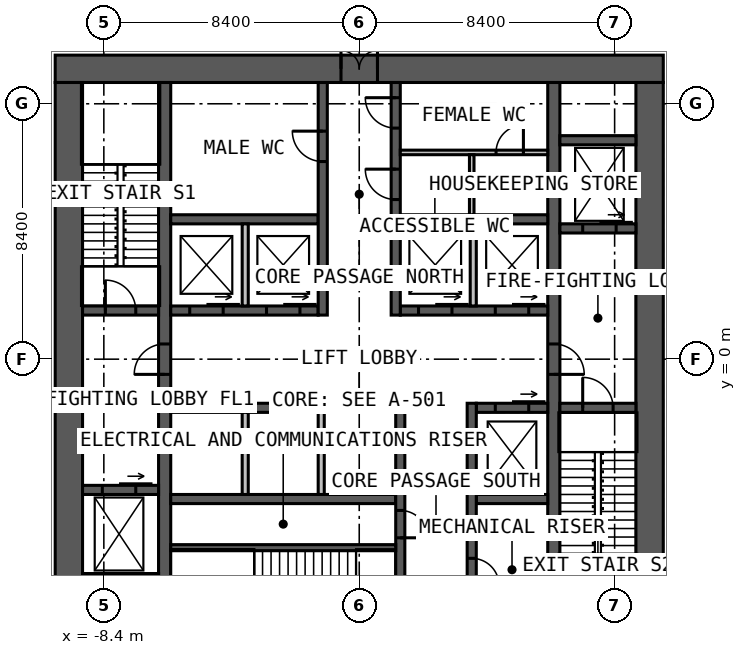
"""IFC4 building model, lengths in metres.
Left out: names, types, materials, properties, quantities, classifications, styles, units other than length and angle.
Written with IfcOpenShell. Run it as: python <this file> out.ifc"""

import sys

from ifc_helpers import new_model, si_unit, direction, frame, frame_2d, origin, place, context, subcontext, project, spatial, rectangle, extrude, element, fill, save


model = new_model("IFC4")
c1 = context("Model", 3, precision=1e-05, world=origin(), true_north=direction((0.0, 1.0)))
c2 = subcontext(c1, "Body", "Model", "MODEL_VIEW")
j1 = project(units=[si_unit("LENGTHUNIT", "METRE"), si_unit("PLANEANGLEUNIT", "RADIAN")], contexts=[c1])
p1 = place(None, origin())
s1 = spatial("IfcSite", under=j1, at=p1, CompositionType="ELEMENT")
p2 = place(p1, origin())
s2 = spatial("IfcBuilding", under=s1, at=p2, CompositionType="ELEMENT")
p3 = place(p2, frame((0.0, 0.0, -9.0)))
s3 = spatial("IfcBuildingStorey", under=s2, at=p3, CompositionType="ELEMENT", Elevation=-9.0)
p4 = place(p3, frame((-10.0, 9.55, 0.0), z_axis=(0.0, 0.0, 1.0), x_axis=(1.0, 0.0, 0.0)))
e1 = element("IfcWall", 1, at=p4, inside=s3, PredefinedType="SOLIDWALL", context=c2, shape_type="SweptSolid", body=[
    extrude(rectangle(XDim=20.0, YDim=0.9, at=frame_2d((10.0, 0.0))), origin(), (0.0, 0.0, 1.0), 4.5),
])
p5 = place(p4, frame((9.4, 0.0, 0.0)))
e2 = element("IfcOpeningElement", 2, at=p5, cuts=e1, PredefinedType="OPENING", context=c2, shape_type="SweptSolid", body=[
    extrude(rectangle(XDim=1.2, YDim=2.2, at=frame_2d((0.6, 1.1))), frame((0.0, 0.46, 0.0), z_axis=(0.0, -1.0, 0.0), x_axis=(1.0, 0.0, 0.0)), (0.0, 0.0, 1.0), 0.92),
])
for number, where, z_axis, x_axis in (
    (3, (9.55, -9.1, 0.0), (0.0, 0.0, 1.0), (0.0, 1.0, 0.0)),
    (4, (-9.55, 9.1, 0.0), (0.0, 0.0, 1.0), (0.0, -1.0, 0.0)),
):
    element("IfcWall", number, at=place(p3, frame(where, z_axis=z_axis, x_axis=x_axis)), inside=s3, PredefinedType="SOLIDWALL", context=c2, shape_type="SweptSolid", body=[
        extrude(rectangle(XDim=18.2, YDim=0.9, at=frame_2d((9.1, 0.0))), origin(), (0.0, 0.0, 1.0), 4.5),
    ])
p6 = place(p3, frame((-6.4, -9.1, 0.0), z_axis=(0.0, 0.0, 1.0), x_axis=(0.0, 1.0, 0.0)))
e5 = element("IfcWall", 5, at=p6, inside=s3, PredefinedType="SOLIDWALL", context=c2, shape_type="SweptSolid", body=[
    extrude(rectangle(XDim=18.2, YDim=0.4, at=frame_2d((9.1, 0.0))), origin(), (0.0, 0.0, 1.0), 4.5),
])
p7 = place(p6, frame((8.6, 0.0, 0.0)))
e6 = element("IfcOpeningElement", 6, at=p7, cuts=e5, PredefinedType="OPENING", context=c2, shape_type="SweptSolid", body=[
    extrude(rectangle(XDim=1.0, YDim=2.2, at=frame_2d((0.5, 1.1))), frame((0.0, 0.21, 0.0), z_axis=(0.0, -1.0, 0.0), x_axis=(1.0, 0.0, 0.0)), (0.0, 0.0, 1.0), 0.42),
])
p8 = place(p3, frame((6.4, 9.1, 0.0), z_axis=(0.0, 0.0, 1.0), x_axis=(0.0, -1.0, 0.0)))
e7 = element("IfcWall", 7, at=p8, inside=s3, PredefinedType="SOLIDWALL", context=c2, shape_type="SweptSolid", body=[
    extrude(rectangle(XDim=18.2, YDim=0.4, at=frame_2d((9.1, 0.0))), origin(), (0.0, 0.0, 1.0), 4.5),
])
p9 = place(p8, frame((8.6, 0.0, 0.0)))
e8 = element("IfcOpeningElement", 8, at=p9, cuts=e7, PredefinedType="OPENING", context=c2, shape_type="SweptSolid", body=[
    extrude(rectangle(XDim=1.0, YDim=2.2, at=frame_2d((0.5, 1.1))), frame((0.0, 0.21, 0.0), z_axis=(0.0, -1.0, 0.0), x_axis=(1.0, 0.0, 0.0)), (0.0, 0.0, 1.0), 0.42),
])
p10 = place(p3, frame((-6.2, 1.6, 0.0), z_axis=(0.0, 0.0, 1.0), x_axis=(1.0, 0.0, 0.0)))
e9 = element("IfcWall", 9, at=p10, inside=s3, PredefinedType="SOLIDWALL", context=c2, shape_type="SweptSolid", body=[
    extrude(rectangle(XDim=4.85, YDim=0.3, at=frame_2d((2.425, 0.0))), origin(), (0.0, 0.0, 1.0), 4.5),
])
p11 = place(p10, frame((0.625, 0.0, 0.0)))
e10 = element("IfcOpeningElement", 10, at=p11, cuts=e9, PredefinedType="OPENING", context=c2, shape_type="SweptSolid", body=[
    extrude(rectangle(XDim=1.1, YDim=2.2, at=frame_2d((0.55, 1.1))), frame((0.0, 0.16, 0.0), z_axis=(0.0, -1.0, 0.0), x_axis=(1.0, 0.0, 0.0)), (0.0, 0.0, 1.0), 0.32),
])
p12 = place(p10, frame((3.15, 0.0, 0.0)))
e11 = element("IfcOpeningElement", 11, at=p12, cuts=e9, PredefinedType="OPENING", context=c2, shape_type="SweptSolid", body=[
    extrude(rectangle(XDim=1.1, YDim=2.2, at=frame_2d((0.55, 1.1))), frame((0.0, 0.16, 0.0), z_axis=(0.0, -1.0, 0.0), x_axis=(1.0, 0.0, 0.0)), (0.0, 0.0, 1.0), 0.32),
])
p13 = place(p3, frame((1.35, 1.6, 0.0), z_axis=(0.0, 0.0, 1.0), x_axis=(1.0, 0.0, 0.0)))
e12 = element("IfcWall", 12, at=p13, inside=s3, PredefinedType="SOLIDWALL", context=c2, shape_type="SweptSolid", body=[
    extrude(rectangle(XDim=4.85, YDim=0.3, at=frame_2d((2.425, 0.0))), origin(), (0.0, 0.0, 1.0), 4.5),
])
p14 = place(p13, frame((0.6, 0.0, 0.0)))
e13 = element("IfcOpeningElement", 13, at=p14, cuts=e12, PredefinedType="OPENING", context=c2, shape_type="SweptSolid", body=[
    extrude(rectangle(XDim=1.1, YDim=2.2, at=frame_2d((0.55, 1.1))), frame((0.0, 0.16, 0.0), z_axis=(0.0, -1.0, 0.0), x_axis=(1.0, 0.0, 0.0)), (0.0, 0.0, 1.0), 0.32),
])
p15 = place(p13, frame((3.125, 0.0, 0.0)))
e14 = element("IfcOpeningElement", 14, at=p15, cuts=e12, PredefinedType="OPENING", context=c2, shape_type="SweptSolid", body=[
    extrude(rectangle(XDim=1.1, YDim=2.2, at=frame_2d((0.55, 1.1))), frame((0.0, 0.16, 0.0), z_axis=(0.0, -1.0, 0.0), x_axis=(1.0, 0.0, 0.0)), (0.0, 0.0, 1.0), 0.32),
])
for number, where, z_axis, x_axis in (
    (15, (-6.2, 4.6, 0.0), (0.0, 0.0, 1.0), (1.0, 0.0, 0.0)),
    (16, (1.35, 4.6, 0.0), (0.0, 0.0, 1.0), (1.0, 0.0, 0.0)),
):
    element("IfcWall", number, at=place(p3, frame(where, z_axis=z_axis, x_axis=x_axis)), inside=s3, PredefinedType="SOLIDWALL", context=c2, shape_type="SweptSolid", body=[
        extrude(rectangle(XDim=4.85, YDim=0.3, at=frame_2d((2.425, 0.0))), origin(), (0.0, 0.0, 1.0), 4.5),
    ])
p16 = place(p3, frame((-1.2, 1.45, 0.0), z_axis=(0.0, 0.0, 1.0), x_axis=(0.0, 1.0, 0.0)))
e17 = element("IfcWall", 17, at=p16, inside=s3, PredefinedType="SOLIDWALL", context=c2, shape_type="SweptSolid", body=[
    extrude(rectangle(XDim=7.65, YDim=0.3, at=frame_2d((3.825, 0.0))), origin(), (0.0, 0.0, 1.0), 4.5),
])
p17 = place(p16, frame((5.05, 0.0, 0.0)))
e18 = element("IfcOpeningElement", 18, at=p17, cuts=e17, PredefinedType="OPENING", context=c2, shape_type="SweptSolid", body=[
    extrude(rectangle(XDim=1.0, YDim=2.2, at=frame_2d((0.5, 1.1))), frame((0.0, 0.16, 0.0), z_axis=(0.0, -1.0, 0.0), x_axis=(1.0, 0.0, 0.0)), (0.0, 0.0, 1.0), 0.32),
])
p18 = place(p3, frame((1.2, 1.45, 0.0), z_axis=(0.0, 0.0, 1.0), x_axis=(0.0, 1.0, 0.0)))
e19 = element("IfcWall", 19, at=p18, inside=s3, PredefinedType="SOLIDWALL", context=c2, shape_type="SweptSolid", body=[
    extrude(rectangle(XDim=7.65, YDim=0.3, at=frame_2d((3.825, 0.0))), origin(), (0.0, 0.0, 1.0), 4.5),
])
p19 = place(p18, frame((3.8, 0.0, 0.0)))
e20 = element("IfcOpeningElement", 20, at=p19, cuts=e19, PredefinedType="OPENING", context=c2, shape_type="SweptSolid", body=[
    extrude(rectangle(XDim=1.0, YDim=2.2, at=frame_2d((0.5, 1.1))), frame((0.0, 0.16, 0.0), z_axis=(0.0, -1.0, 0.0), x_axis=(1.0, 0.0, 0.0)), (0.0, 0.0, 1.0), 0.32),
])
p20 = place(p18, frame((6.15, 0.0, 0.0)))
e21 = element("IfcOpeningElement", 21, at=p20, cuts=e19, PredefinedType="OPENING", context=c2, shape_type="SweptSolid", body=[
    extrude(rectangle(XDim=1.0, YDim=2.2, at=frame_2d((0.5, 1.1))), frame((0.0, 0.16, 0.0), z_axis=(0.0, -1.0, 0.0), x_axis=(1.0, 0.0, 0.0)), (0.0, 0.0, 1.0), 0.32),
])
p21 = place(p3, frame((-6.2, -1.6, 0.0), z_axis=(0.0, 0.0, 1.0), x_axis=(1.0, 0.0, 0.0)))
e22 = element("IfcWall", 22, at=p21, inside=s3, PredefinedType="SOLIDWALL", context=c2, shape_type="SweptSolid", body=[
    extrude(rectangle(XDim=7.4, YDim=0.3, at=frame_2d((3.7, 0.0))), origin(), (0.0, 0.0, 1.0), 4.5),
])
p22 = place(p3, frame((3.85, -1.6, 0.0), z_axis=(0.0, 0.0, 1.0), x_axis=(1.0, 0.0, 0.0)))
e23 = element("IfcWall", 23, at=p22, inside=s3, PredefinedType="SOLIDWALL", context=c2, shape_type="SweptSolid", body=[
    extrude(rectangle(XDim=2.35, YDim=0.3, at=frame_2d((1.175, 0.0))), origin(), (0.0, 0.0, 1.0), 4.5),
])
p23 = place(p22, frame((0.625, 0.0, 0.0)))
e24 = element("IfcOpeningElement", 24, at=p23, cuts=e23, PredefinedType="OPENING", context=c2, shape_type="SweptSolid", body=[
    extrude(rectangle(XDim=1.1, YDim=2.2, at=frame_2d((0.55, 1.1))), frame((0.0, 0.16, 0.0), z_axis=(0.0, -1.0, 0.0), x_axis=(1.0, 0.0, 0.0)), (0.0, 0.0, 1.0), 0.32),
])
p24 = place(p3, frame((-6.2, -4.6, 0.0), z_axis=(0.0, 0.0, 1.0), x_axis=(1.0, 0.0, 0.0)))
e25 = element("IfcWall", 25, at=p24, inside=s3, PredefinedType="SOLIDWALL", context=c2, shape_type="SweptSolid", body=[
    extrude(rectangle(XDim=7.4, YDim=0.3, at=frame_2d((3.7, 0.0))), origin(), (0.0, 0.0, 1.0), 4.5),
])
p25 = place(p3, frame((3.85, -4.6, 0.0), z_axis=(0.0, 0.0, 1.0), x_axis=(1.0, 0.0, 0.0)))
e26 = element("IfcWall", 26, at=p25, inside=s3, PredefinedType="SOLIDWALL", context=c2, shape_type="SweptSolid", body=[
    extrude(rectangle(XDim=2.35, YDim=0.3, at=frame_2d((1.175, 0.0))), origin(), (0.0, 0.0, 1.0), 4.5),
])
p26 = place(p3, frame((1.35, -1.45, 0.0), z_axis=(0.0, 0.0, 1.0), x_axis=(0.0, -1.0, 0.0)))
e27 = element("IfcWall", 27, at=p26, inside=s3, PredefinedType="SOLIDWALL", context=c2, shape_type="SweptSolid", body=[
    extrude(rectangle(XDim=7.65, YDim=0.3, at=frame_2d((3.825, 0.0))), origin(), (0.0, 0.0, 1.0), 4.5),
])
p27 = place(p26, frame((5.75, 0.0, 0.0)))
e28 = element("IfcOpeningElement", 28, at=p27, cuts=e27, PredefinedType="OPENING", context=c2, shape_type="SweptSolid", body=[
    extrude(rectangle(XDim=1.0, YDim=2.2, at=frame_2d((0.5, 1.1))), frame((0.0, 0.16, 0.0), z_axis=(0.0, -1.0, 0.0), x_axis=(1.0, 0.0, 0.0)), (0.0, 0.0, 1.0), 0.32),
])
p28 = place(p26, frame((3.525, 0.0, 0.0)))
e29 = element("IfcOpeningElement", 29, at=p28, cuts=e27, PredefinedType="OPENING", context=c2, shape_type="SweptSolid", body=[
    extrude(rectangle(XDim=0.9, YDim=2.2, at=frame_2d((0.45, 1.1))), frame((0.0, 0.16, 0.0), z_axis=(0.0, -1.0, 0.0), x_axis=(1.0, 0.0, 0.0)), (0.0, 0.0, 1.0), 0.32),
])
p29 = place(p3, frame((3.7, -1.45, 0.0), z_axis=(0.0, 0.0, 1.0), x_axis=(0.0, -1.0, 0.0)))
e30 = element("IfcWall", 30, at=p29, inside=s3, PredefinedType="SOLIDWALL", context=c2, shape_type="SweptSolid", body=[
    extrude(rectangle(XDim=7.65, YDim=0.3, at=frame_2d((3.825, 0.0))), origin(), (0.0, 0.0, 1.0), 4.5),
])
p30 = place(p29, frame((5.1, 0.0, 0.0)))
e31 = element("IfcOpeningElement", 31, at=p30, cuts=e30, PredefinedType="OPENING", context=c2, shape_type="SweptSolid", body=[
    extrude(rectangle(XDim=0.9, YDim=2.2, at=frame_2d((0.45, 1.1))), frame((0.0, 0.16, 0.0), z_axis=(0.0, -1.0, 0.0), x_axis=(1.0, 0.0, 0.0)), (0.0, 0.0, 1.0), 0.32),
])
p31 = place(p3, frame((-6.2, -6.2, 0.0), z_axis=(0.0, 0.0, 1.0), x_axis=(1.0, 0.0, 0.0)))
e32 = element("IfcWall", 32, at=p31, inside=s3, PredefinedType="SOLIDWALL", context=c2, shape_type="SweptSolid", body=[
    extrude(rectangle(XDim=7.4, YDim=0.2, at=frame_2d((3.7, 0.0))), origin(), (0.0, 0.0, 1.0), 4.5),
])
p32 = place(p3, frame((-9.1, 1.6, 0.0), z_axis=(0.0, 0.0, 1.0), x_axis=(1.0, 0.0, 0.0)))
e33 = element("IfcWall", 33, at=p32, inside=s3, PredefinedType="SOLIDWALL", context=c2, shape_type="SweptSolid", body=[
    extrude(rectangle(XDim=2.5, YDim=0.3, at=frame_2d((1.25, 0.0))), origin(), (0.0, 0.0, 1.0), 4.5),
])
p33 = place(p32, frame((0.75, 0.0, 0.0)))
e34 = element("IfcOpeningElement", 34, at=p33, cuts=e33, PredefinedType="OPENING", context=c2, shape_type="SweptSolid", body=[
    extrude(rectangle(XDim=1.0, YDim=2.2, at=frame_2d((0.5, 1.1))), frame((0.0, 0.16, 0.0), z_axis=(0.0, -1.0, 0.0), x_axis=(1.0, 0.0, 0.0)), (0.0, 0.0, 1.0), 0.32),
])
p34 = place(p3, frame((6.6, -1.6, 0.0), z_axis=(0.0, 0.0, 1.0), x_axis=(1.0, 0.0, 0.0)))
e35 = element("IfcWall", 35, at=p34, inside=s3, PredefinedType="SOLIDWALL", context=c2, shape_type="SweptSolid", body=[
    extrude(rectangle(XDim=2.5, YDim=0.3, at=frame_2d((1.25, 0.0))), origin(), (0.0, 0.0, 1.0), 4.5),
])
p35 = place(p34, frame((0.75, 0.0, 0.0)))
e36 = element("IfcOpeningElement", 36, at=p35, cuts=e35, PredefinedType="OPENING", context=c2, shape_type="SweptSolid", body=[
    extrude(rectangle(XDim=1.0, YDim=2.2, at=frame_2d((0.5, 1.1))), frame((0.0, 0.16, 0.0), z_axis=(0.0, -1.0, 0.0), x_axis=(1.0, 0.0, 0.0)), (0.0, 0.0, 1.0), 0.32),
])
p36 = place(p3, frame((-9.1, -4.3, 0.0), z_axis=(0.0, 0.0, 1.0), x_axis=(1.0, 0.0, 0.0)))
e37 = element("IfcWall", 37, at=p36, inside=s3, PredefinedType="SOLIDWALL", context=c2, shape_type="SweptSolid", body=[
    extrude(rectangle(XDim=2.5, YDim=0.3, at=frame_2d((1.25, 0.0))), origin(), (0.0, 0.0, 1.0), 4.5),
])
p37 = place(p36, frame((0.65, 0.0, 0.0)))
e38 = element("IfcOpeningElement", 38, at=p37, cuts=e37, PredefinedType="OPENING", context=c2, shape_type="SweptSolid", body=[
    extrude(rectangle(XDim=1.1, YDim=2.2, at=frame_2d((0.55, 1.1))), frame((0.0, 0.16, 0.0), z_axis=(0.0, -1.0, 0.0), x_axis=(1.0, 0.0, 0.0)), (0.0, 0.0, 1.0), 0.32),
])
p38 = place(p3, frame((6.6, 4.3, 0.0), z_axis=(0.0, 0.0, 1.0), x_axis=(1.0, 0.0, 0.0)))
e39 = element("IfcWall", 39, at=p38, inside=s3, PredefinedType="SOLIDWALL", context=c2, shape_type="SweptSolid", body=[
    extrude(rectangle(XDim=2.5, YDim=0.3, at=frame_2d((1.25, 0.0))), origin(), (0.0, 0.0, 1.0), 4.5),
])
p39 = place(p38, frame((0.75, 0.0, 0.0)))
e40 = element("IfcOpeningElement", 40, at=p39, cuts=e39, PredefinedType="OPENING", context=c2, shape_type="SweptSolid", body=[
    extrude(rectangle(XDim=1.1, YDim=2.2, at=frame_2d((0.55, 1.1))), frame((0.0, 0.16, 0.0), z_axis=(0.0, -1.0, 0.0), x_axis=(1.0, 0.0, 0.0)), (0.0, 0.0, 1.0), 0.32),
])
for number, where, z_axis, x_axis in (
    (41, (-9.1, -7.2, 0.0), (0.0, 0.0, 1.0), (1.0, 0.0, 0.0)),
    (42, (6.6, 7.2, 0.0), (0.0, 0.0, 1.0), (1.0, 0.0, 0.0)),
):
    element("IfcWall", number, at=place(p3, frame(where, z_axis=z_axis, x_axis=x_axis)), inside=s3, PredefinedType="SOLIDWALL", context=c2, shape_type="SweptSolid", body=[
        extrude(rectangle(XDim=2.5, YDim=0.3, at=frame_2d((1.25, 0.0))), origin(), (0.0, 0.0, 1.0), 4.5),
    ])
for number, where, z_axis, x_axis in (
    (43, (-3.75, 1.75, 0.0), (0.0, 0.0, 1.0), (0.0, 1.0, 0.0)),
    (44, (3.75, 1.75, 0.0), (0.0, 0.0, 1.0), (0.0, 1.0, 0.0)),
    (45, (-3.75, -1.75, 0.0), (0.0, 0.0, 1.0), (0.0, -1.0, 0.0)),
    (46, (-1.25, -1.75, 0.0), (0.0, 0.0, 1.0), (0.0, -1.0, 0.0)),
):
    element("IfcWall", number, at=place(p3, frame(where, z_axis=z_axis, x_axis=x_axis)), inside=s3, PredefinedType="SOLIDWALL", context=c2, shape_type="SweptSolid", body=[
        extrude(rectangle(XDim=2.7, YDim=0.2, at=frame_2d((1.35, 0.0))), origin(), (0.0, 0.0, 1.0), 4.25),
    ])
p40 = place(p3, frame((1.35, 6.8, 0.0), z_axis=(0.0, 0.0, 1.0), x_axis=(1.0, 0.0, 0.0)))
e47 = element("IfcWall", 47, at=p40, inside=s3, PredefinedType="PARTITIONING", context=c2, shape_type="SweptSolid", body=[
    extrude(rectangle(XDim=4.85, YDim=0.15, at=frame_2d((2.425, 0.0))), origin(), (0.0, 0.0, 1.0), 4.25),
])
p41 = place(p40, frame((3.15, 0.0, 0.0)))
e48 = element("IfcOpeningElement", 48, at=p41, cuts=e47, PredefinedType="OPENING", context=c2, shape_type="SweptSolid", body=[
    extrude(rectangle(XDim=0.9, YDim=2.2, at=frame_2d((0.45, 1.1))), frame((0.0, 0.085, 0.0), z_axis=(0.0, -1.0, 0.0), x_axis=(1.0, 0.0, 0.0)), (0.0, 0.0, 1.0), 0.17),
])
p42 = place(p3, frame((3.7, 4.75, 0.0), z_axis=(0.0, 0.0, 1.0), x_axis=(0.0, 1.0, 0.0)))
e49 = element("IfcWall", 49, at=p42, inside=s3, PredefinedType="PARTITIONING", context=c2, shape_type="SweptSolid", body=[
    extrude(rectangle(XDim=1.975, YDim=0.15, at=frame_2d((0.988, 0.0))), origin(), (0.0, 0.0, 1.0), 4.25),
])
p43 = place(p5, origin())
e50 = element("IfcDoor", 50, at=p43, inside=s3, OperationType="DOUBLE_DOOR_SINGLE_SWING", PredefinedType="DOOR", context=c2, shape_type="SweptSolid", body=[
    extrude(rectangle(XDim=1.2, YDim=2.2, at=frame_2d((0.6, 1.1))), frame((0.0, 0.025, 0.0), z_axis=(0.0, -1.0, 0.0), x_axis=(1.0, 0.0, 0.0)), (0.0, 0.0, 1.0), 0.05),
])
fill(e2, e50)
p44 = place(p7, origin())
e51 = element("IfcDoor", 51, at=p44, inside=s3, OperationType="SINGLE_SWING_LEFT", PredefinedType="DOOR", context=c2, shape_type="SweptSolid", body=[
    extrude(rectangle(XDim=1.0, YDim=2.2, at=frame_2d((0.5, 1.1))), frame((0.0, 0.025, 0.0), z_axis=(0.0, -1.0, 0.0), x_axis=(1.0, 0.0, 0.0)), (0.0, 0.0, 1.0), 0.05),
])
fill(e6, e51)
p45 = place(p9, origin())
e52 = element("IfcDoor", 52, at=p45, inside=s3, OperationType="SINGLE_SWING_RIGHT", PredefinedType="DOOR", context=c2, shape_type="SweptSolid", body=[
    extrude(rectangle(XDim=1.0, YDim=2.2, at=frame_2d((0.5, 1.1))), frame((0.0, 0.025, 0.0), z_axis=(0.0, -1.0, 0.0), x_axis=(1.0, 0.0, 0.0)), (0.0, 0.0, 1.0), 0.05),
])
fill(e8, e52)
p46 = place(p33, origin())
e53 = element("IfcDoor", 53, at=p46, inside=s3, OperationType="SINGLE_SWING_LEFT", PredefinedType="DOOR", context=c2, shape_type="SweptSolid", body=[
    extrude(rectangle(XDim=1.0, YDim=2.2, at=frame_2d((0.5, 1.1))), frame((0.0, 0.025, 0.0), z_axis=(0.0, -1.0, 0.0), x_axis=(1.0, 0.0, 0.0)), (0.0, 0.0, 1.0), 0.05),
])
fill(e34, e53)
p47 = place(p35, origin())
e54 = element("IfcDoor", 54, at=p47, inside=s3, OperationType="SINGLE_SWING_LEFT", PredefinedType="DOOR", context=c2, shape_type="SweptSolid", body=[
    extrude(rectangle(XDim=1.0, YDim=2.2, at=frame_2d((0.5, 1.1))), frame((0.0, 0.025, 0.0), z_axis=(0.0, -1.0, 0.0), x_axis=(1.0, 0.0, 0.0)), (0.0, 0.0, 1.0), 0.05),
])
fill(e36, e54)
p48 = place(p17, origin())
e55 = element("IfcDoor", 55, at=p48, inside=s3, OperationType="SINGLE_SWING_RIGHT", PredefinedType="DOOR", context=c2, shape_type="SweptSolid", body=[
    extrude(rectangle(XDim=1.0, YDim=2.2, at=frame_2d((0.5, 1.1))), frame((0.0, 0.025, 0.0), z_axis=(0.0, -1.0, 0.0), x_axis=(1.0, 0.0, 0.0)), (0.0, 0.0, 1.0), 0.05),
])
fill(e18, e55)
p49 = place(p19, origin())
e56 = element("IfcDoor", 56, at=p49, inside=s3, OperationType="SINGLE_SWING_RIGHT", PredefinedType="DOOR", context=c2, shape_type="SweptSolid", body=[
    extrude(rectangle(XDim=1.0, YDim=2.2, at=frame_2d((0.5, 1.1))), frame((0.0, 0.025, 0.0), z_axis=(0.0, -1.0, 0.0), x_axis=(1.0, 0.0, 0.0)), (0.0, 0.0, 1.0), 0.05),
])
fill(e20, e56)
p50 = place(p20, origin())
e57 = element("IfcDoor", 57, at=p50, inside=s3, OperationType="SINGLE_SWING_RIGHT", PredefinedType="DOOR", context=c2, shape_type="SweptSolid", body=[
    extrude(rectangle(XDim=1.0, YDim=2.2, at=frame_2d((0.5, 1.1))), frame((0.0, 0.025, 0.0), z_axis=(0.0, -1.0, 0.0), x_axis=(1.0, 0.0, 0.0)), (0.0, 0.0, 1.0), 0.05),
])
fill(e21, e57)
p51 = place(p28, origin())
e58 = element("IfcDoor", 58, at=p51, inside=s3, OperationType="SINGLE_SWING_RIGHT", PredefinedType="DOOR", context=c2, shape_type="SweptSolid", body=[
    extrude(rectangle(XDim=0.9, YDim=2.2, at=frame_2d((0.45, 1.1))), frame((0.0, 0.025, 0.0), z_axis=(0.0, -1.0, 0.0), x_axis=(1.0, 0.0, 0.0)), (0.0, 0.0, 1.0), 0.05),
])
fill(e29, e58)
p52 = place(p30, origin())
e59 = element("IfcDoor", 59, at=p52, inside=s3, OperationType="SINGLE_SWING_RIGHT", PredefinedType="DOOR", context=c2, shape_type="SweptSolid", body=[
    extrude(rectangle(XDim=0.9, YDim=2.2, at=frame_2d((0.45, 1.1))), frame((0.0, 0.025, 0.0), z_axis=(0.0, -1.0, 0.0), x_axis=(1.0, 0.0, 0.0)), (0.0, 0.0, 1.0), 0.05),
])
fill(e31, e59)
p53 = place(p41, origin())
e60 = element("IfcDoor", 60, at=p53, inside=s3, OperationType="SINGLE_SWING_RIGHT", PredefinedType="DOOR", context=c2, shape_type="SweptSolid", body=[
    extrude(rectangle(XDim=0.9, YDim=2.2, at=frame_2d((0.45, 1.1))), frame((0.0, 0.025, 0.0), z_axis=(0.0, -1.0, 0.0), x_axis=(1.0, 0.0, 0.0)), (0.0, 0.0, 1.0), 0.05),
])
fill(e48, e60)
p54 = place(p11, origin())
e61 = element("IfcDoor", 61, at=p54, inside=s3, OperationType="SLIDING_TO_LEFT", PredefinedType="DOOR", context=c2, shape_type="SweptSolid", body=[
    extrude(rectangle(XDim=1.1, YDim=2.2, at=frame_2d((0.55, 1.1))), frame((0.0, 0.025, 0.0), z_axis=(0.0, -1.0, 0.0), x_axis=(1.0, 0.0, 0.0)), (0.0, 0.0, 1.0), 0.05),
])
fill(e10, e61)
p55 = place(p12, origin())
e62 = element("IfcDoor", 62, at=p55, inside=s3, OperationType="SLIDING_TO_LEFT", PredefinedType="DOOR", context=c2, shape_type="SweptSolid", body=[
    extrude(rectangle(XDim=1.1, YDim=2.2, at=frame_2d((0.55, 1.1))), frame((0.0, 0.025, 0.0), z_axis=(0.0, -1.0, 0.0), x_axis=(1.0, 0.0, 0.0)), (0.0, 0.0, 1.0), 0.05),
])
fill(e11, e62)
p56 = place(p14, origin())
e63 = element("IfcDoor", 63, at=p56, inside=s3, OperationType="SLIDING_TO_LEFT", PredefinedType="DOOR", context=c2, shape_type="SweptSolid", body=[
    extrude(rectangle(XDim=1.1, YDim=2.2, at=frame_2d((0.55, 1.1))), frame((0.0, 0.025, 0.0), z_axis=(0.0, -1.0, 0.0), x_axis=(1.0, 0.0, 0.0)), (0.0, 0.0, 1.0), 0.05),
])
fill(e13, e63)
p57 = place(p15, origin())
e64 = element("IfcDoor", 64, at=p57, inside=s3, OperationType="SLIDING_TO_LEFT", PredefinedType="DOOR", context=c2, shape_type="SweptSolid", body=[
    extrude(rectangle(XDim=1.1, YDim=2.2, at=frame_2d((0.55, 1.1))), frame((0.0, 0.025, 0.0), z_axis=(0.0, -1.0, 0.0), x_axis=(1.0, 0.0, 0.0)), (0.0, 0.0, 1.0), 0.05),
])
fill(e14, e64)
p58 = place(p23, origin())
e65 = element("IfcDoor", 65, at=p58, inside=s3, OperationType="SLIDING_TO_LEFT", PredefinedType="DOOR", context=c2, shape_type="SweptSolid", body=[
    extrude(rectangle(XDim=1.1, YDim=2.2, at=frame_2d((0.55, 1.1))), frame((0.0, 0.025, 0.0), z_axis=(0.0, -1.0, 0.0), x_axis=(1.0, 0.0, 0.0)), (0.0, 0.0, 1.0), 0.05),
])
fill(e24, e65)
p59 = place(p37, origin())
e66 = element("IfcDoor", 66, at=p59, inside=s3, OperationType="SLIDING_TO_LEFT", PredefinedType="DOOR", context=c2, shape_type="SweptSolid", body=[
    extrude(rectangle(XDim=1.1, YDim=2.2, at=frame_2d((0.55, 1.1))), frame((0.0, 0.025, 0.0), z_axis=(0.0, -1.0, 0.0), x_axis=(1.0, 0.0, 0.0)), (0.0, 0.0, 1.0), 0.05),
])
fill(e38, e66)
p60 = place(p39, origin())
e67 = element("IfcDoor", 67, at=p60, inside=s3, OperationType="SLIDING_TO_LEFT", PredefinedType="DOOR", context=c2, shape_type="SweptSolid", body=[
    extrude(rectangle(XDim=1.1, YDim=2.2, at=frame_2d((0.55, 1.1))), frame((0.0, 0.025, 0.0), z_axis=(0.0, -1.0, 0.0), x_axis=(1.0, 0.0, 0.0)), (0.0, 0.0, 1.0), 0.05),
])
fill(e40, e67)
save(model, sys.argv[1])
